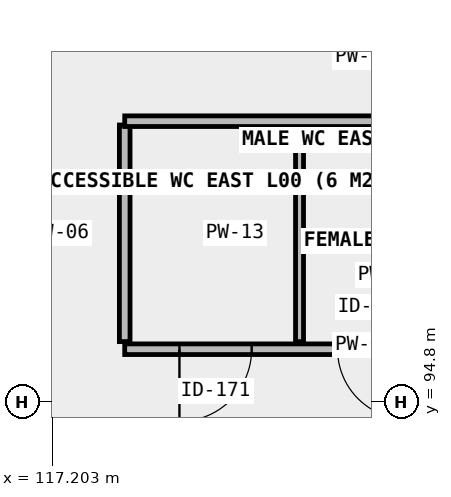
"""IFC4 building model, lengths in metres.
Left out: names, types, materials, properties, quantities, classifications, styles, units other than length and angle.
Written with IfcOpenShell. Run it as: python <this file> out.ifc"""

import sys

from ifc_helpers import new_model, si_unit, direction, frame, frame_2d, origin, place, context, subcontext, project, spatial, rectangle, extrude, element, fill, save


model = new_model("IFC4")
c1 = context("Model", 3, precision=1e-05, world=origin(), true_north=direction((0.0, 1.0)))
c2 = subcontext(c1, "Body", "Model", "MODEL_VIEW")
j1 = project(units=[si_unit("LENGTHUNIT", "METRE"), si_unit("PLANEANGLEUNIT", "RADIAN")], contexts=[c1])
p1 = place(None, origin())
s1 = spatial("IfcSite", under=j1, at=p1, CompositionType="ELEMENT")
p2 = place(p1, origin())
s2 = spatial("IfcBuilding", under=s1, at=p2, CompositionType="ELEMENT")
p3 = place(p2, origin())
s3 = spatial("IfcBuildingStorey", under=s2, at=p3, CompositionType="ELEMENT", Elevation=0.0)
p4 = place(p3, frame((118.15, 95.5, 0.0), z_axis=(0.0, 0.0, 1.0), x_axis=(1.0, 0.0, 0.0)))
e1 = element("IfcWall", 1, at=p4, inside=s3, PredefinedType="PLUMBINGWALL", context=c2, shape_type="SweptSolid", body=[
    extrude(rectangle(XDim=6.3, YDim=0.14, at=frame_2d((3.15, 0.0))), origin(), (0.0, 0.0, 1.0), 3.88),
])
p5 = place(p4, frame((0.72, 0.0, 0.0)))
e2 = element("IfcOpeningElement", 2, at=p5, cuts=e1, PredefinedType="OPENING", context=c2, shape_type="SweptSolid", body=[
    extrude(rectangle(XDim=0.95, YDim=2.1, at=frame_2d((0.475, 1.05))), frame((0.0, 0.08, 0.0), z_axis=(0.0, -1.0, 0.0), x_axis=(1.0, 0.0, 0.0)), (0.0, 0.0, 1.0), 0.16),
])
p6 = place(p4, frame((2.8, 0.0, 0.0)))
e3 = element("IfcOpeningElement", 3, at=p6, cuts=e1, PredefinedType="OPENING", context=c2, shape_type="SweptSolid", body=[
    extrude(rectangle(XDim=0.92, YDim=2.1, at=frame_2d((0.46, 1.05))), frame((0.0, 0.08, 0.0), z_axis=(0.0, -1.0, 0.0), x_axis=(1.0, 0.0, 0.0)), (0.0, 0.0, 1.0), 0.16),
])
p7 = place(p4, frame((4.8, 0.0, 0.0)))
e4 = element("IfcOpeningElement", 4, at=p7, cuts=e1, PredefinedType="OPENING", context=c2, shape_type="SweptSolid", body=[
    extrude(rectangle(XDim=0.92, YDim=2.1, at=frame_2d((0.46, 1.05))), frame((0.0, 0.08, 0.0), z_axis=(0.0, -1.0, 0.0), x_axis=(1.0, 0.0, 0.0)), (0.0, 0.0, 1.0), 0.16),
])
p8 = place(p3, frame((118.15, 95.6, 0.0), z_axis=(0.0, 0.0, 1.0), x_axis=(0.0, 1.0, 0.0)))
e5 = element("IfcWall", 5, at=p8, inside=s3, PredefinedType="PLUMBINGWALL", context=c2, shape_type="SweptSolid", body=[
    extrude(rectangle(XDim=2.85, YDim=0.14, at=frame_2d((1.425, 0.0))), origin(), (0.0, 0.0, 1.0), 3.88),
])
p9 = place(p3, frame((120.45, 95.6, 0.0), z_axis=(0.0, 0.0, 1.0), x_axis=(0.0, 1.0, 0.0)))
e6 = element("IfcWall", 6, at=p9, inside=s3, PredefinedType="PARTITIONING", context=c2, shape_type="SweptSolid", body=[
    extrude(rectangle(XDim=2.85, YDim=0.105, at=frame_2d((1.425, 0.0))), origin(), (0.0, 0.0, 1.0), 3.88),
])
p10 = place(p3, frame((118.15, 98.5, 0.0), z_axis=(0.0, 0.0, 1.0), x_axis=(1.0, 0.0, 0.0)))
e7 = element("IfcWall", 7, at=p10, inside=s3, PredefinedType="PLUMBINGWALL", context=c2, shape_type="SweptSolid", body=[
    extrude(rectangle(XDim=6.3, YDim=0.14, at=frame_2d((3.15, 0.0))), origin(), (0.0, 0.0, 1.0), 3.88),
])
p11 = place(p5, frame((0.475, 0.0, 0.0), z_axis=(0.0, 0.0, 1.0), x_axis=(-1.0, 0.0, 0.0)))
e8 = element("IfcDoor", 8, at=p11, inside=s3, OperationType="SINGLE_SWING_LEFT", PredefinedType="DOOR", context=c2, shape_type="SweptSolid", body=[
    extrude(rectangle(XDim=0.95, YDim=2.1, at=frame_2d((0.0, 1.05))), frame((0.0, 0.025, 0.0), z_axis=(0.0, -1.0, 0.0), x_axis=(1.0, 0.0, 0.0)), (0.0, 0.0, 1.0), 0.05),
])
fill(e2, e8)
p12 = place(p6, origin())
e9 = element("IfcDoor", 9, at=p12, inside=s3, OperationType="SINGLE_SWING_RIGHT", PredefinedType="DOOR", context=c2, shape_type="SweptSolid", body=[
    extrude(rectangle(XDim=0.92, YDim=2.1, at=frame_2d((0.46, 1.05))), frame((0.0, 0.025, 0.0), z_axis=(0.0, -1.0, 0.0), x_axis=(1.0, 0.0, 0.0)), (0.0, 0.0, 1.0), 0.05),
])
fill(e3, e9)
save(model, sys.argv[1])
